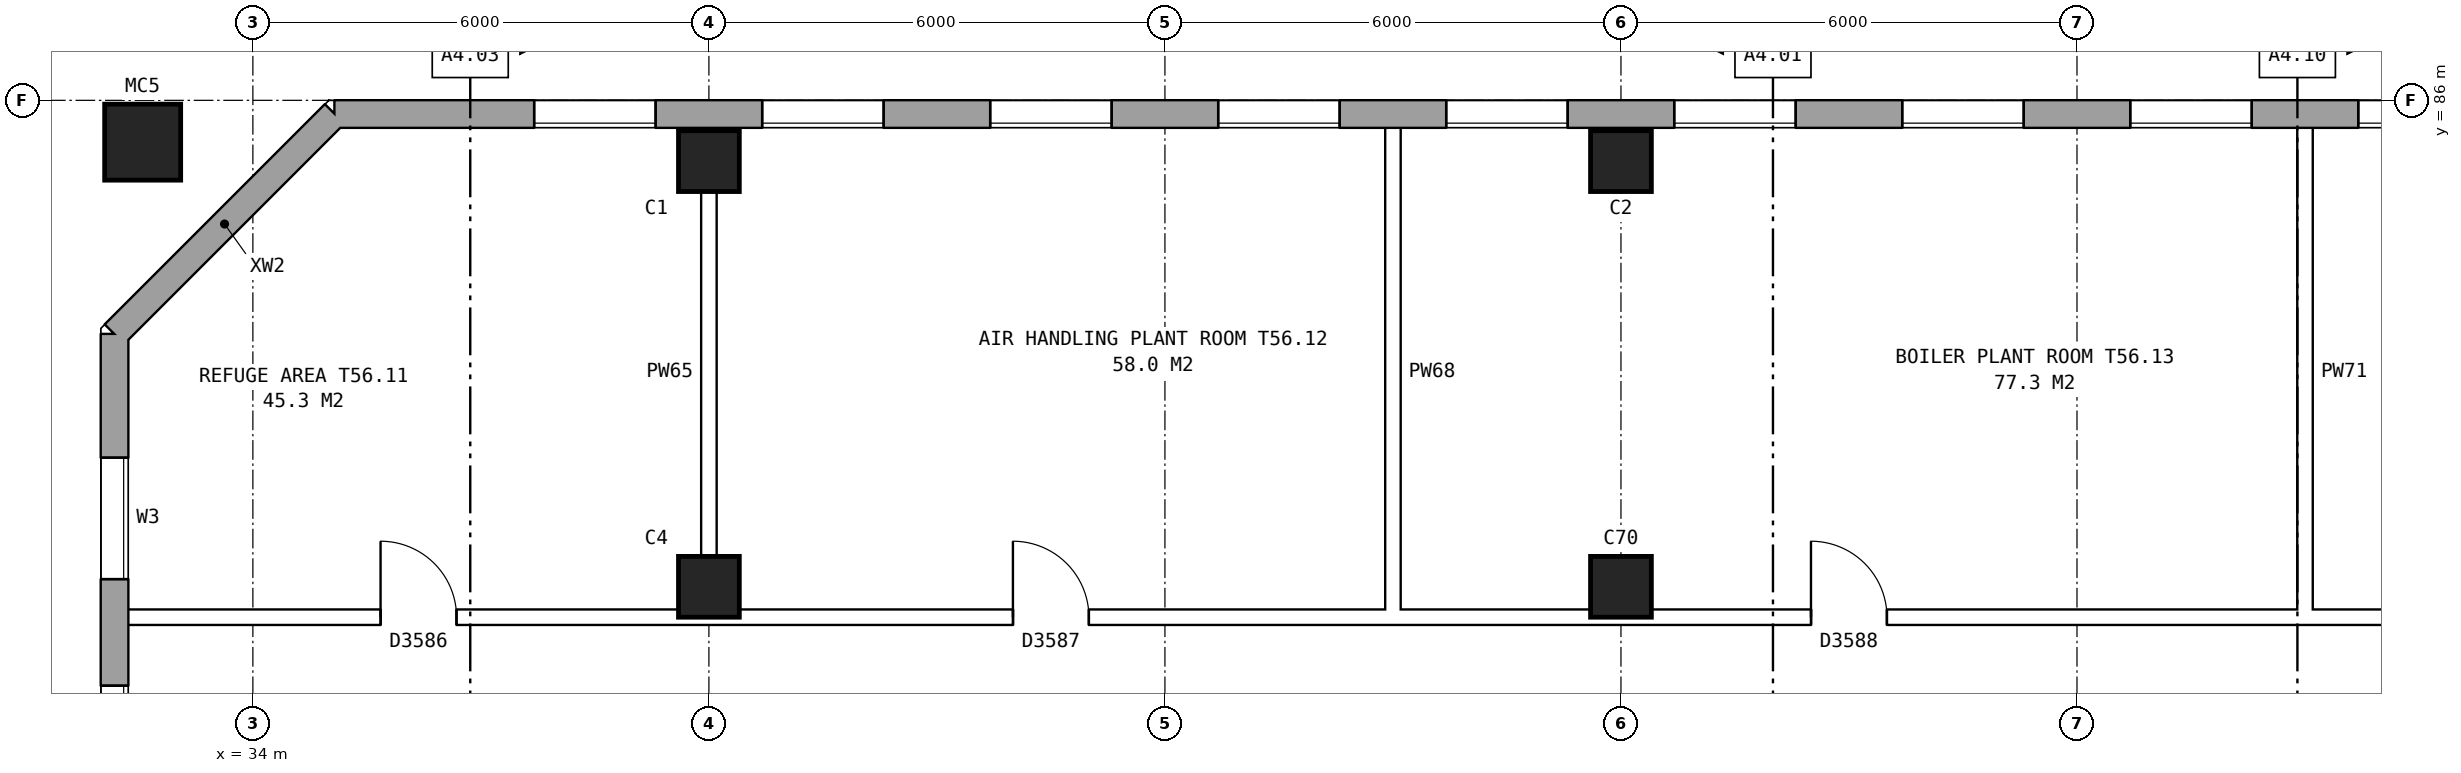
"""IFC4 building model, lengths in metres.
Left out: names, types, materials, properties, quantities, classifications, styles, units other than length and angle.
Written with IfcOpenShell. Run it as: python <this file> out.ifc"""

import sys

from ifc_helpers import new_model, si_unit, direction, frame, frame_2d, origin, origin_2d, place, context, subcontext, project, spatial, rectangle, hollow_rectangle, extrude, element, fill, save


model = new_model("IFC4")
c1 = context("Model", 3, precision=1e-05, world=origin(), true_north=direction((0.0, 1.0)))
c2 = subcontext(c1, "Body", "Model", "MODEL_VIEW")
j1 = project(units=[si_unit("LENGTHUNIT", "METRE"), si_unit("PLANEANGLEUNIT", "RADIAN")], contexts=[c1])
p1 = place(None, origin())
s1 = spatial("IfcSite", under=j1, at=p1, CompositionType="ELEMENT")
p2 = place(p1, origin())
s2 = spatial("IfcBuilding", under=s1, at=p2, CompositionType="ELEMENT")
p3 = place(p2, frame((0.0, 0.0, 198.6)))
s3 = spatial("IfcBuildingStorey", under=s2, at=p3, CompositionType="ELEMENT", Elevation=198.6)
for number, where, z_axis, x_axis in (
    (1, (40.0, 79.6, 0.0), (0.0, 0.0, 1.0), (1.0, 0.0, 0.0)),
    (2, (40.0, 85.2, 0.0), (0.0, 0.0, 1.0), (1.0, 0.0, 0.0)),
    (3, (52.0, 79.6, 0.0), (0.0, 0.0, 1.0), (1.0, 0.0, 0.0)),
    (4, (52.0, 85.2, 0.0), (0.0, 0.0, 1.0), (1.0, 0.0, 0.0)),
):
    element("IfcColumn", number, at=place(p3, frame(where, z_axis=z_axis, x_axis=x_axis)), inside=s3, PredefinedType="COLUMN", context=c2, shape_type="SweptSolid", body=[
        extrude(rectangle(XDim=0.8, YDim=0.8, at=origin_2d()), origin(), (0.0, 0.0, 1.0), 3.7),
    ])
p4 = place(p3, frame((32.55, 85.45, 0.0), z_axis=(0.0, 0.0, 1.0), x_axis=(1.0, 0.0, 0.0)))
e5 = element("IfcColumn", 5, at=p4, inside=s3, PredefinedType="COLUMN", context=c2, shape_type="SweptSolid", body=[
    extrude(hollow_rectangle(XDim=1.0, YDim=1.0, WallThickness=0.055, at=origin_2d()), origin(), (0.0, 0.0, 1.0), 4.2),
])
p5 = place(p3, frame((74.95, 85.82, 0.0), z_axis=(0.0, 0.0, 1.0), x_axis=(-1.0, 0.0, 0.0)))
e6 = element("IfcWall", 6, at=p5, inside=s3, PredefinedType="STANDARD", context=c2, shape_type="SweptSolid", body=[
    extrude(rectangle(XDim=39.875, YDim=0.36, at=frame_2d((19.938, 0.0))), origin(), (0.0, 0.0, 1.0), 3.7),
])
p6 = place(p5, frame((2.65, 0.0, 1.5)))
e7 = element("IfcOpeningElement", 7, at=p6, cuts=e6, PredefinedType="OPENING", context=c2, shape_type="SweptSolid", body=[
    extrude(rectangle(XDim=1.6, YDim=1.2, at=frame_2d((0.8, 0.6))), frame((0.0, 0.19, 0.0), z_axis=(0.0, -1.0, 0.0), x_axis=(1.0, 0.0, 0.0)), (0.0, 0.0, 1.0), 0.38),
])
p7 = place(p5, frame((5.65, 0.0, 1.5)))
e8 = element("IfcOpeningElement", 8, at=p7, cuts=e6, PredefinedType="OPENING", context=c2, shape_type="SweptSolid", body=[
    extrude(rectangle(XDim=1.6, YDim=1.2, at=frame_2d((0.8, 0.6))), frame((0.0, 0.19, 0.0), z_axis=(0.0, -1.0, 0.0), x_axis=(1.0, 0.0, 0.0)), (0.0, 0.0, 1.0), 0.38),
])
p8 = place(p5, frame((8.65, 0.0, 1.5)))
e9 = element("IfcOpeningElement", 9, at=p8, cuts=e6, PredefinedType="OPENING", context=c2, shape_type="SweptSolid", body=[
    extrude(rectangle(XDim=1.6, YDim=1.2, at=frame_2d((0.8, 0.6))), frame((0.0, 0.19, 0.0), z_axis=(0.0, -1.0, 0.0), x_axis=(1.0, 0.0, 0.0)), (0.0, 0.0, 1.0), 0.38),
])
p9 = place(p5, frame((11.65, 0.0, 1.5)))
e10 = element("IfcOpeningElement", 10, at=p9, cuts=e6, PredefinedType="OPENING", context=c2, shape_type="SweptSolid", body=[
    extrude(rectangle(XDim=1.6, YDim=1.2, at=frame_2d((0.8, 0.6))), frame((0.0, 0.19, 0.0), z_axis=(0.0, -1.0, 0.0), x_axis=(1.0, 0.0, 0.0)), (0.0, 0.0, 1.0), 0.38),
])
p10 = place(p5, frame((14.65, 0.0, 1.5)))
e11 = element("IfcOpeningElement", 11, at=p10, cuts=e6, PredefinedType="OPENING", context=c2, shape_type="SweptSolid", body=[
    extrude(rectangle(XDim=1.6, YDim=1.2, at=frame_2d((0.8, 0.6))), frame((0.0, 0.19, 0.0), z_axis=(0.0, -1.0, 0.0), x_axis=(1.0, 0.0, 0.0)), (0.0, 0.0, 1.0), 0.38),
])
p11 = place(p5, frame((17.65, 0.0, 1.5)))
e12 = element("IfcOpeningElement", 12, at=p11, cuts=e6, PredefinedType="OPENING", context=c2, shape_type="SweptSolid", body=[
    extrude(rectangle(XDim=1.6, YDim=1.2, at=frame_2d((0.8, 0.6))), frame((0.0, 0.19, 0.0), z_axis=(0.0, -1.0, 0.0), x_axis=(1.0, 0.0, 0.0)), (0.0, 0.0, 1.0), 0.38),
])
p12 = place(p5, frame((20.65, 0.0, 1.5)))
e13 = element("IfcOpeningElement", 13, at=p12, cuts=e6, PredefinedType="OPENING", context=c2, shape_type="SweptSolid", body=[
    extrude(rectangle(XDim=1.6, YDim=1.2, at=frame_2d((0.8, 0.6))), frame((0.0, 0.19, 0.0), z_axis=(0.0, -1.0, 0.0), x_axis=(1.0, 0.0, 0.0)), (0.0, 0.0, 1.0), 0.38),
])
p13 = place(p5, frame((23.65, 0.0, 1.5)))
e14 = element("IfcOpeningElement", 14, at=p13, cuts=e6, PredefinedType="OPENING", context=c2, shape_type="SweptSolid", body=[
    extrude(rectangle(XDim=1.6, YDim=1.2, at=frame_2d((0.8, 0.6))), frame((0.0, 0.19, 0.0), z_axis=(0.0, -1.0, 0.0), x_axis=(1.0, 0.0, 0.0)), (0.0, 0.0, 1.0), 0.38),
])
p14 = place(p5, frame((26.65, 0.0, 1.5)))
e15 = element("IfcOpeningElement", 15, at=p14, cuts=e6, PredefinedType="OPENING", context=c2, shape_type="SweptSolid", body=[
    extrude(rectangle(XDim=1.6, YDim=1.2, at=frame_2d((0.8, 0.6))), frame((0.0, 0.19, 0.0), z_axis=(0.0, -1.0, 0.0), x_axis=(1.0, 0.0, 0.0)), (0.0, 0.0, 1.0), 0.38),
])
p15 = place(p5, frame((29.65, 0.0, 1.5)))
e16 = element("IfcOpeningElement", 16, at=p15, cuts=e6, PredefinedType="OPENING", context=c2, shape_type="SweptSolid", body=[
    extrude(rectangle(XDim=1.6, YDim=1.2, at=frame_2d((0.8, 0.6))), frame((0.0, 0.19, 0.0), z_axis=(0.0, -1.0, 0.0), x_axis=(1.0, 0.0, 0.0)), (0.0, 0.0, 1.0), 0.38),
])
p16 = place(p5, frame((32.65, 0.0, 1.5)))
e17 = element("IfcOpeningElement", 17, at=p16, cuts=e6, PredefinedType="OPENING", context=c2, shape_type="SweptSolid", body=[
    extrude(rectangle(XDim=1.6, YDim=1.2, at=frame_2d((0.8, 0.6))), frame((0.0, 0.19, 0.0), z_axis=(0.0, -1.0, 0.0), x_axis=(1.0, 0.0, 0.0)), (0.0, 0.0, 1.0), 0.38),
])
p17 = place(p5, frame((35.65, 0.0, 1.5)))
e18 = element("IfcOpeningElement", 18, at=p17, cuts=e6, PredefinedType="OPENING", context=c2, shape_type="SweptSolid", body=[
    extrude(rectangle(XDim=1.6, YDim=1.2, at=frame_2d((0.8, 0.6))), frame((0.0, 0.19, 0.0), z_axis=(0.0, -1.0, 0.0), x_axis=(1.0, 0.0, 0.0)), (0.0, 0.0, 1.0), 0.38),
])
p18 = place(p3, frame((35.075, 85.82, 0.0), z_axis=(0.0, 0.0, 1.0), x_axis=(-0.707106781187, -0.707106781187, 0.0)))
e19 = element("IfcWall", 19, at=p18, inside=s3, PredefinedType="STANDARD", context=c2, shape_type="SweptSolid", body=[
    extrude(rectangle(XDim=4.094, YDim=0.36, at=frame_2d((2.047, 0.0))), origin(), (0.0, 0.0, 1.0), 3.7),
])
p19 = place(p3, frame((32.18, 82.925, 0.0), z_axis=(0.0, 0.0, 1.0), x_axis=(0.0, -1.0, 0.0)))
e20 = element("IfcWall", 20, at=p19, inside=s3, PredefinedType="STANDARD", context=c2, shape_type="SweptSolid", body=[
    extrude(rectangle(XDim=25.851, YDim=0.36, at=frame_2d((12.925, 0.0))), origin(), (0.0, 0.0, 1.0), 3.7),
])
p20 = place(p19, frame((1.625, 0.0, 1.5)))
e21 = element("IfcOpeningElement", 21, at=p20, cuts=e20, PredefinedType="OPENING", context=c2, shape_type="SweptSolid", body=[
    extrude(rectangle(XDim=1.6, YDim=1.2, at=frame_2d((0.8, 0.6))), frame((0.0, 0.19, 0.0), z_axis=(0.0, -1.0, 0.0), x_axis=(1.0, 0.0, 0.0)), (0.0, 0.0, 1.0), 0.38),
])
p21 = place(p19, frame((4.625, 0.0, 1.5)))
e22 = element("IfcOpeningElement", 22, at=p21, cuts=e20, PredefinedType="OPENING", context=c2, shape_type="SweptSolid", body=[
    extrude(rectangle(XDim=1.6, YDim=1.2, at=frame_2d((0.8, 0.6))), frame((0.0, 0.19, 0.0), z_axis=(0.0, -1.0, 0.0), x_axis=(1.0, 0.0, 0.0)), (0.0, 0.0, 1.0), 0.38),
])
p22 = place(p19, frame((19.625, 0.0, 1.5)))
e23 = element("IfcOpeningElement", 23, at=p22, cuts=e20, PredefinedType="OPENING", context=c2, shape_type="SweptSolid", body=[
    extrude(rectangle(XDim=1.6, YDim=1.2, at=frame_2d((0.8, 0.6))), frame((0.0, 0.19, 0.0), z_axis=(0.0, -1.0, 0.0), x_axis=(1.0, 0.0, 0.0)), (0.0, 0.0, 1.0), 0.38),
])
p23 = place(p19, frame((22.625, 0.0, 1.5)))
e24 = element("IfcOpeningElement", 24, at=p23, cuts=e20, PredefinedType="OPENING", context=c2, shape_type="SweptSolid", body=[
    extrude(rectangle(XDim=1.6, YDim=1.2, at=frame_2d((0.8, 0.6))), frame((0.0, 0.19, 0.0), z_axis=(0.0, -1.0, 0.0), x_axis=(1.0, 0.0, 0.0)), (0.0, 0.0, 1.0), 0.38),
])
p24 = place(p3, frame((32.24, 79.2, 0.0), z_axis=(0.0, 0.0, 1.0), x_axis=(1.0, 0.0, 0.0)))
e25 = element("IfcWall", 25, at=p24, inside=s3, PredefinedType="PARTITIONING", context=c2, shape_type="SweptSolid", body=[
    extrude(rectangle(XDim=99.22, YDim=0.2, at=frame_2d((49.61, 0.0))), origin(), (0.0, 0.0, 1.0), 3.7),
])
p25 = place(p24, frame((3.44, 0.0, 0.0)))
e26 = element("IfcOpeningElement", 26, at=p25, cuts=e25, PredefinedType="OPENING", context=c2, shape_type="SweptSolid", body=[
    extrude(rectangle(XDim=1.0, YDim=2.1, at=frame_2d((0.5, 1.05))), frame((0.0, 0.11, 0.0), z_axis=(0.0, -1.0, 0.0), x_axis=(1.0, 0.0, 0.0)), (0.0, 0.0, 1.0), 0.22),
])
p26 = place(p24, frame((11.76, 0.0, 0.0)))
e27 = element("IfcOpeningElement", 27, at=p26, cuts=e25, PredefinedType="OPENING", context=c2, shape_type="SweptSolid", body=[
    extrude(rectangle(XDim=1.0, YDim=2.1, at=frame_2d((0.5, 1.05))), frame((0.0, 0.11, 0.0), z_axis=(0.0, -1.0, 0.0), x_axis=(1.0, 0.0, 0.0)), (0.0, 0.0, 1.0), 0.22),
])
p27 = place(p24, frame((22.26, 0.0, 0.0)))
e28 = element("IfcOpeningElement", 28, at=p27, cuts=e25, PredefinedType="OPENING", context=c2, shape_type="SweptSolid", body=[
    extrude(rectangle(XDim=1.0, YDim=2.1, at=frame_2d((0.5, 1.05))), frame((0.0, 0.11, 0.0), z_axis=(0.0, -1.0, 0.0), x_axis=(1.0, 0.0, 0.0)), (0.0, 0.0, 1.0), 0.22),
])
p28 = place(p24, frame((35.58, 0.0, 0.0)))
e29 = element("IfcOpeningElement", 29, at=p28, cuts=e25, PredefinedType="OPENING", context=c2, shape_type="SweptSolid", body=[
    extrude(rectangle(XDim=1.0, YDim=2.1, at=frame_2d((0.5, 1.05))), frame((0.0, 0.11, 0.0), z_axis=(0.0, -1.0, 0.0), x_axis=(1.0, 0.0, 0.0)), (0.0, 0.0, 1.0), 0.22),
])
p29 = place(p24, frame((53.392, 0.0, 0.0)))
e30 = element("IfcOpeningElement", 30, at=p29, cuts=e25, PredefinedType="OPENING", context=c2, shape_type="SweptSolid", body=[
    extrude(rectangle(XDim=1.0, YDim=2.1, at=frame_2d((0.5, 1.05))), frame((0.0, 0.11, 0.0), z_axis=(0.0, -1.0, 0.0), x_axis=(1.0, 0.0, 0.0)), (0.0, 0.0, 1.0), 0.22),
])
p30 = place(p24, frame((74.198, 0.0, 0.0)))
e31 = element("IfcOpeningElement", 31, at=p30, cuts=e25, PredefinedType="OPENING", context=c2, shape_type="SweptSolid", body=[
    extrude(rectangle(XDim=1.0, YDim=2.1, at=frame_2d((0.5, 1.05))), frame((0.0, 0.11, 0.0), z_axis=(0.0, -1.0, 0.0), x_axis=(1.0, 0.0, 0.0)), (0.0, 0.0, 1.0), 0.22),
])
p31 = place(p24, frame((91.565, 0.0, 0.0)))
e32 = element("IfcOpeningElement", 32, at=p31, cuts=e25, PredefinedType="OPENING", context=c2, shape_type="SweptSolid", body=[
    extrude(rectangle(XDim=1.0, YDim=2.1, at=frame_2d((0.5, 1.05))), frame((0.0, 0.11, 0.0), z_axis=(0.0, -1.0, 0.0), x_axis=(1.0, 0.0, 0.0)), (0.0, 0.0, 1.0), 0.22),
])
for number, where, z_axis, x_axis in (
    (33, (40.0, 79.1, 0.0), (0.0, 0.0, 1.0), (0.0, 1.0, 0.0)),
    (34, (49.0, 79.1, 0.0), (0.0, 0.0, 1.0), (0.0, 1.0, 0.0)),
    (35, (61.0, 79.1, 0.0), (0.0, 0.0, 1.0), (0.0, 1.0, 0.0)),
):
    element("IfcWall", number, at=place(p3, frame(where, z_axis=z_axis, x_axis=x_axis)), inside=s3, PredefinedType="PARTITIONING", context=c2, shape_type="SweptSolid", body=[
        extrude(rectangle(XDim=6.66, YDim=0.2, at=frame_2d((3.33, 0.0))), origin(), (0.0, 0.0, 1.0), 3.7),
    ])
p32 = place(p9, origin())
e36 = element("IfcWindow", 36, at=p32, inside=s3, PartitioningType="DOUBLE_PANEL_HORIZONTAL", PredefinedType="WINDOW", context=c2, shape_type="SweptSolid", body=[
    extrude(rectangle(XDim=1.6, YDim=1.2, at=frame_2d((0.8, 0.6))), frame((0.0, 0.15, 0.0), z_axis=(0.0, -1.0, 0.0), x_axis=(1.0, 0.0, 0.0)), (0.0, 0.0, 1.0), 0.06),
])
fill(e10, e36)
p33 = place(p10, origin())
e37 = element("IfcWindow", 37, at=p33, inside=s3, PartitioningType="DOUBLE_PANEL_HORIZONTAL", PredefinedType="WINDOW", context=c2, shape_type="SweptSolid", body=[
    extrude(rectangle(XDim=1.6, YDim=1.2, at=frame_2d((0.8, 0.6))), frame((0.0, 0.15, 0.0), z_axis=(0.0, -1.0, 0.0), x_axis=(1.0, 0.0, 0.0)), (0.0, 0.0, 1.0), 0.06),
])
fill(e11, e37)
p34 = place(p11, origin())
e38 = element("IfcWindow", 38, at=p34, inside=s3, PartitioningType="DOUBLE_PANEL_HORIZONTAL", PredefinedType="WINDOW", context=c2, shape_type="SweptSolid", body=[
    extrude(rectangle(XDim=1.6, YDim=1.2, at=frame_2d((0.8, 0.6))), frame((0.0, 0.15, 0.0), z_axis=(0.0, -1.0, 0.0), x_axis=(1.0, 0.0, 0.0)), (0.0, 0.0, 1.0), 0.06),
])
fill(e12, e38)
p35 = place(p12, origin())
e39 = element("IfcWindow", 39, at=p35, inside=s3, PartitioningType="DOUBLE_PANEL_HORIZONTAL", PredefinedType="WINDOW", context=c2, shape_type="SweptSolid", body=[
    extrude(rectangle(XDim=1.6, YDim=1.2, at=frame_2d((0.8, 0.6))), frame((0.0, 0.15, 0.0), z_axis=(0.0, -1.0, 0.0), x_axis=(1.0, 0.0, 0.0)), (0.0, 0.0, 1.0), 0.06),
])
fill(e13, e39)
p36 = place(p13, origin())
e40 = element("IfcWindow", 40, at=p36, inside=s3, PartitioningType="DOUBLE_PANEL_HORIZONTAL", PredefinedType="WINDOW", context=c2, shape_type="SweptSolid", body=[
    extrude(rectangle(XDim=1.6, YDim=1.2, at=frame_2d((0.8, 0.6))), frame((0.0, 0.15, 0.0), z_axis=(0.0, -1.0, 0.0), x_axis=(1.0, 0.0, 0.0)), (0.0, 0.0, 1.0), 0.06),
])
fill(e14, e40)
p37 = place(p14, origin())
e41 = element("IfcWindow", 41, at=p37, inside=s3, PartitioningType="DOUBLE_PANEL_HORIZONTAL", PredefinedType="WINDOW", context=c2, shape_type="SweptSolid", body=[
    extrude(rectangle(XDim=1.6, YDim=1.2, at=frame_2d((0.8, 0.6))), frame((0.0, 0.15, 0.0), z_axis=(0.0, -1.0, 0.0), x_axis=(1.0, 0.0, 0.0)), (0.0, 0.0, 1.0), 0.06),
])
fill(e15, e41)
p38 = place(p15, origin())
e42 = element("IfcWindow", 42, at=p38, inside=s3, PartitioningType="DOUBLE_PANEL_HORIZONTAL", PredefinedType="WINDOW", context=c2, shape_type="SweptSolid", body=[
    extrude(rectangle(XDim=1.6, YDim=1.2, at=frame_2d((0.8, 0.6))), frame((0.0, 0.15, 0.0), z_axis=(0.0, -1.0, 0.0), x_axis=(1.0, 0.0, 0.0)), (0.0, 0.0, 1.0), 0.06),
])
fill(e16, e42)
p39 = place(p16, origin())
e43 = element("IfcWindow", 43, at=p39, inside=s3, PartitioningType="DOUBLE_PANEL_HORIZONTAL", PredefinedType="WINDOW", context=c2, shape_type="SweptSolid", body=[
    extrude(rectangle(XDim=1.6, YDim=1.2, at=frame_2d((0.8, 0.6))), frame((0.0, 0.15, 0.0), z_axis=(0.0, -1.0, 0.0), x_axis=(1.0, 0.0, 0.0)), (0.0, 0.0, 1.0), 0.06),
])
fill(e17, e43)
p40 = place(p17, origin())
e44 = element("IfcWindow", 44, at=p40, inside=s3, PartitioningType="DOUBLE_PANEL_HORIZONTAL", PredefinedType="WINDOW", context=c2, shape_type="SweptSolid", body=[
    extrude(rectangle(XDim=1.6, YDim=1.2, at=frame_2d((0.8, 0.6))), frame((0.0, 0.15, 0.0), z_axis=(0.0, -1.0, 0.0), x_axis=(1.0, 0.0, 0.0)), (0.0, 0.0, 1.0), 0.06),
])
fill(e18, e44)
p41 = place(p20, origin())
e45 = element("IfcWindow", 45, at=p41, inside=s3, PartitioningType="DOUBLE_PANEL_HORIZONTAL", PredefinedType="WINDOW", context=c2, shape_type="SweptSolid", body=[
    extrude(rectangle(XDim=1.6, YDim=1.2, at=frame_2d((0.8, 0.6))), frame((0.0, 0.15, 0.0), z_axis=(0.0, -1.0, 0.0), x_axis=(1.0, 0.0, 0.0)), (0.0, 0.0, 1.0), 0.06),
])
fill(e21, e45)
p42 = place(p21, origin())
e46 = element("IfcWindow", 46, at=p42, inside=s3, PartitioningType="DOUBLE_PANEL_HORIZONTAL", PredefinedType="WINDOW", context=c2, shape_type="SweptSolid", body=[
    extrude(rectangle(XDim=1.6, YDim=1.2, at=frame_2d((0.8, 0.6))), frame((0.0, 0.15, 0.0), z_axis=(0.0, -1.0, 0.0), x_axis=(1.0, 0.0, 0.0)), (0.0, 0.0, 1.0), 0.06),
])
fill(e22, e46)
p43 = place(p25, origin())
e47 = element("IfcDoor", 47, at=p43, inside=s3, OperationType="SINGLE_SWING_LEFT", PredefinedType="DOOR", context=c2, shape_type="SweptSolid", body=[
    extrude(rectangle(XDim=1.0, YDim=2.1, at=frame_2d((0.5, 1.05))), frame((0.0, 0.025, 0.0), z_axis=(0.0, -1.0, 0.0), x_axis=(1.0, 0.0, 0.0)), (0.0, 0.0, 1.0), 0.05),
])
fill(e26, e47)
p44 = place(p26, origin())
e48 = element("IfcDoor", 48, at=p44, inside=s3, OperationType="SINGLE_SWING_LEFT", PredefinedType="DOOR", context=c2, shape_type="SweptSolid", body=[
    extrude(rectangle(XDim=1.0, YDim=2.1, at=frame_2d((0.5, 1.05))), frame((0.0, 0.025, 0.0), z_axis=(0.0, -1.0, 0.0), x_axis=(1.0, 0.0, 0.0)), (0.0, 0.0, 1.0), 0.05),
])
fill(e27, e48)
p45 = place(p27, origin())
e49 = element("IfcDoor", 49, at=p45, inside=s3, OperationType="SINGLE_SWING_LEFT", PredefinedType="DOOR", context=c2, shape_type="SweptSolid", body=[
    extrude(rectangle(XDim=1.0, YDim=2.1, at=frame_2d((0.5, 1.05))), frame((0.0, 0.025, 0.0), z_axis=(0.0, -1.0, 0.0), x_axis=(1.0, 0.0, 0.0)), (0.0, 0.0, 1.0), 0.05),
])
fill(e28, e49)
save(model, sys.argv[1])
